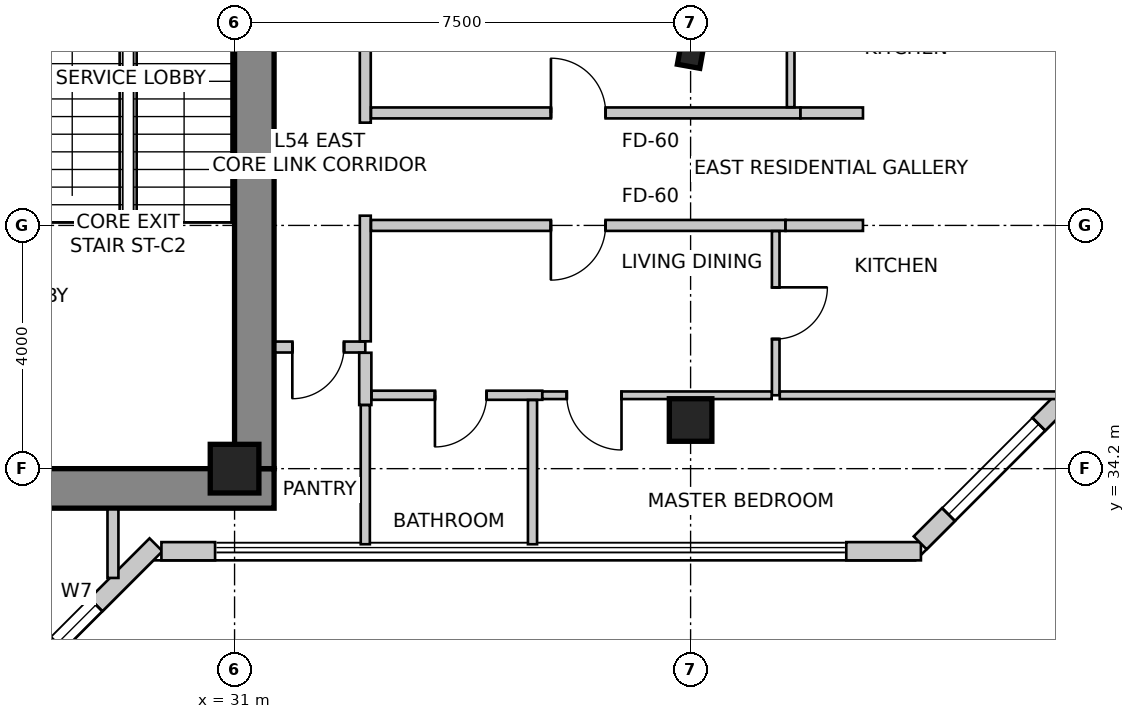
"""IFC4 building model, lengths in metres.
Left out: names, types, materials, properties, quantities, classifications, styles, units other than length and angle.
Written with IfcOpenShell. Run it as: python <this file> out.ifc"""

import sys

from ifc_helpers import new_model, si_unit, direction, frame, frame_2d, origin, origin_2d, place, context, subcontext, project, spatial, rectangle, i_section, extrude, source, transform, mapped, element, fill, save


model = new_model("IFC4")
c1 = context("Model", 3, precision=1e-05, world=origin(), true_north=direction((0.0, 1.0)))
c2 = subcontext(c1, "Body", "Model", "MODEL_VIEW")
j1 = project(units=[si_unit("LENGTHUNIT", "METRE"), si_unit("PLANEANGLEUNIT", "RADIAN")], contexts=[c1])
p1 = place(None, origin())
s1 = spatial("IfcSite", under=j1, at=p1, CompositionType="ELEMENT")
p2 = place(p1, origin())
s2 = spatial("IfcBuilding", under=s1, at=p2, CompositionType="ELEMENT")
p3 = place(p2, frame((0.0, 0.0, 214.9)))
s3 = spatial("IfcBuildingStorey", under=s2, at=p3, CompositionType="ELEMENT", Elevation=214.9)
p4 = place(p3, frame((15.95, 33.875, 0.0), z_axis=(0.0, 0.0, 1.0), x_axis=(1.0, 0.0, 0.0)))
e1 = element("IfcWall", 1, at=p4, inside=s3, PredefinedType="SHEAR", context=c2, shape_type="SweptSolid", body=[
    extrude(rectangle(XDim=15.7, YDim=0.65, at=frame_2d((7.85, 0.0))), origin(), (0.0, 0.0, 1.0), 3.5),
])
m1 = source(origin(), c2, "Body", "SweptSolid", [
    extrude(rectangle(XDim=1.1, YDim=2.15, at=frame_2d((0.55, 1.075))), frame((0.0, 0.335, 0.0), z_axis=(0.0, -1.0, 0.0), x_axis=(1.0, 0.0, 0.0)), (0.0, 0.0, 1.0), 0.67),
])
p5 = place(p4, frame((10.08, 0.0, 0.0)))
e2 = element("IfcOpeningElement", 2, at=p5, cuts=e1, PredefinedType="OPENING", context=c2, shape_type="MappedRepresentation", body=[
    mapped(m1, transform((0.0, 0.0, 0.0), scale=1.0)),
])
p6 = place(p3, frame((31.325, 34.2, 0.0), z_axis=(0.0, 0.0, 1.0), x_axis=(0.0, 1.0, 0.0)))
e3 = element("IfcWall", 3, at=p6, inside=s3, PredefinedType="SHEAR", context=c2, shape_type="SweptSolid", body=[
    extrude(rectangle(XDim=11.4, YDim=0.65, at=frame_2d((5.7, 0.0))), origin(), (0.0, 0.0, 1.0), 3.5),
])
p7 = place(p6, frame((7.35, 0.0, 0.0)))
e4 = element("IfcOpeningElement", 4, at=p7, cuts=e3, PredefinedType="OPENING", context=c2, shape_type="MappedRepresentation", body=[
    mapped(m1, transform((0.0, 0.0, 0.0), scale=1.0)),
])
m2 = source(origin(), c2, "Body", "SweptSolid", [
    extrude(rectangle(XDim=0.8, YDim=0.8, at=origin_2d()), origin(), (0.0, 0.0, 1.0), 3.5),
])
p8 = place(p3, frame((31.0, 34.2, 0.0), z_axis=(0.0, 0.0, 1.0), x_axis=(1.0, 0.0, 0.0)))
e5 = element("IfcColumn", 5, at=p8, inside=s3, PredefinedType="COLUMN", context=c2, shape_type="MappedRepresentation", body=[
    mapped(m2, transform((0.0, 0.0, 0.0), scale=1.0)),
])
m3 = source(origin(), c2, "Body", "SweptSolid", [
    extrude(rectangle(XDim=0.7, YDim=0.7, at=origin_2d()), origin(), (0.0, 0.0, 1.0), 3.5),
])
p9 = place(p3, frame((38.5, 35.0, 0.0), z_axis=(0.0, 0.0, 1.0), x_axis=(1.0, 0.0, 0.0)))
e6 = element("IfcColumn", 6, at=p9, inside=s3, PredefinedType="COLUMN", context=c2, shape_type="MappedRepresentation", body=[
    mapped(m3, transform((0.0, 0.0, 0.0), scale=1.0)),
])
m4 = source(origin(), c2, "Body", "SweptSolid", [
    extrude(i_section(OverallWidth=0.374, OverallDepth=0.372, WebThickness=0.016, FlangeThickness=0.026, FilletRadius=0.015, at=origin_2d()), origin(), (0.0, 0.0, 1.0), 3.5),
])
p10 = place(p3, frame((38.5, 41.0, 0.0), z_axis=(0.0, 0.0, 1.0), x_axis=(0.984195607969, -0.17708474032, 0.0)))
e7 = element("IfcColumn", 7, at=p10, inside=s3, PredefinedType="COLUMN", context=c2, shape_type="MappedRepresentation", body=[
    mapped(m4, transform((0.0, 0.0, 0.0), scale=1.0)),
])
p11 = place(p3, frame((27.652, 30.892, 0.0), z_axis=(0.0, 0.0, 1.0), x_axis=(0.707106781187, 0.707106781187, 0.0)))
e8 = element("IfcWall", 8, at=p11, inside=s3, PredefinedType="SOLIDWALL", context=c2, shape_type="SweptSolid", body=[
    extrude(rectangle(XDim=2.907, YDim=0.3, at=frame_2d((1.454, 0.0))), origin(), (0.0, 0.0, 1.0), 3.25),
])
m5 = source(origin(), c2, "Body", "SweptSolid", [
    extrude(rectangle(XDim=0.9, YDim=1.6, at=frame_2d((0.45, 0.8))), frame((0.0, 0.16, 0.0), z_axis=(0.0, -1.0, 0.0), x_axis=(1.0, 0.0, 0.0)), (0.0, 0.0, 1.0), 0.32),
])
p12 = place(p11, frame((0.611, 0.0, 0.85)))
e9 = element("IfcOpeningElement", 9, at=p12, cuts=e8, PredefinedType="OPENING", context=c2, shape_type="MappedRepresentation", body=[
    mapped(m5, transform((0.0, 0.0, 0.0), scale=1.0)),
])
p13 = place(p3, frame((29.797, 32.842, 0.0), z_axis=(0.0, 0.0, 1.0), x_axis=(1.0, 0.0, 0.0)))
e10 = element("IfcWall", 10, at=p13, inside=s3, PredefinedType="SOLIDWALL", context=c2, shape_type="SweptSolid", body=[
    extrude(rectangle(XDim=0.882, YDim=0.3, at=frame_2d((0.441, 0.0))), origin(), (0.0, 0.0, 1.0), 3.25),
])
p14 = place(p3, frame((41.06, 32.842, 0.0), z_axis=(0.0, 0.0, 1.0), x_axis=(1.0, 0.0, 0.0)))
e11 = element("IfcWall", 11, at=p14, inside=s3, PredefinedType="SOLIDWALL", context=c2, shape_type="SweptSolid", body=[
    extrude(rectangle(XDim=1.228, YDim=0.3, at=frame_2d((0.614, 0.0))), origin(), (0.0, 0.0, 1.0), 3.25),
])
p15 = place(p3, frame((42.276, 32.98, 0.0), z_axis=(0.0, 0.0, 1.0), x_axis=(0.707106781187, 0.707106781187, 0.0)))
e12 = element("IfcWall", 12, at=p15, inside=s3, PredefinedType="SOLIDWALL", context=c2, shape_type="SweptSolid", body=[
    extrude(rectangle(XDim=4.922, YDim=0.3, at=frame_2d((2.461, 0.0))), origin(), (0.0, 0.0, 1.0), 3.25),
])
m6 = source(origin(), c2, "Body", "SweptSolid", [
    extrude(rectangle(XDim=2.1, YDim=2.0, at=frame_2d((1.05, 1.0))), frame((0.0, 0.16, 0.0), z_axis=(0.0, -1.0, 0.0), x_axis=(1.0, 0.0, 0.0)), (0.0, 0.0, 1.0), 0.32),
])
p16 = place(p15, frame((0.659, 0.0, 0.85)))
e13 = element("IfcOpeningElement", 13, at=p16, cuts=e12, PredefinedType="OPENING", context=c2, shape_type="MappedRepresentation", body=[
    mapped(m6, transform((0.0, 0.0, 0.0), scale=1.0)),
])
p17 = place(p3, frame((29.0, 33.53, 0.0), z_axis=(0.0, 0.0, 1.0), x_axis=(0.0, -1.0, 0.0)))
e14 = element("IfcWall", 14, at=p17, inside=s3, PredefinedType="PARTITIONING", context=c2, shape_type="SweptSolid", body=[
    extrude(rectangle(XDim=1.127, YDim=0.18, at=frame_2d((0.563, 0.0))), origin(), (0.0, 0.0, 1.0), 3.25),
])
p18 = place(p3, frame((33.15, 36.2, 0.0), z_axis=(0.0, 0.0, 1.0), x_axis=(-1.0, 0.0, 0.0)))
e15 = element("IfcWall", 15, at=p18, inside=s3, PredefinedType="PARTITIONING", context=c2, shape_type="SweptSolid", body=[
    extrude(rectangle(XDim=1.48, YDim=0.18, at=frame_2d((0.74, 0.0))), origin(), (0.0, 0.0, 1.0), 3.25),
])
m7 = source(origin(), c2, "Body", "SweptSolid", [
    extrude(rectangle(XDim=0.85, YDim=2.15, at=frame_2d((0.425, 1.075))), frame((0.0, 0.1, 0.0), z_axis=(0.0, -1.0, 0.0), x_axis=(1.0, 0.0, 0.0)), (0.0, 0.0, 1.0), 0.2),
])
p19 = place(p18, frame((0.35, 0.0, 0.0)))
e16 = element("IfcOpeningElement", 16, at=p19, cuts=e15, PredefinedType="OPENING", context=c2, shape_type="MappedRepresentation", body=[
    mapped(m7, transform((0.0, 0.0, 0.0), scale=1.0)),
])
p20 = place(p3, frame((33.15, 45.577, 0.0), z_axis=(0.0, 0.0, 1.0), x_axis=(0.0, -1.0, 0.0)))
e17 = element("IfcWall", 17, at=p20, inside=s3, PredefinedType="PARTITIONING", context=c2, shape_type="SweptSolid", body=[
    extrude(rectangle(XDim=5.687, YDim=0.18, at=frame_2d((2.844, 0.0))), origin(), (0.0, 0.0, 1.0), 2.688),
])
p21 = place(p3, frame((33.15, 38.36, 0.0), z_axis=(0.0, 0.0, 1.0), x_axis=(0.0, -1.0, 0.0)))
e18 = element("IfcWall", 18, at=p21, inside=s3, PredefinedType="PARTITIONING", context=c2, shape_type="SweptSolid", body=[
    extrude(rectangle(XDim=2.066, YDim=0.18, at=frame_2d((1.033, 0.0))), origin(), (0.0, 0.0, 1.0), 3.25),
])
p22 = place(p3, frame((33.244, 40.05, 0.0), z_axis=(0.0, 0.0, 1.0), x_axis=(1.0, 0.0, 0.0)))
e19 = element("IfcWall", 19, at=p22, inside=s3, PredefinedType="PARTITIONING", context=c2, shape_type="SweptSolid", body=[
    extrude(rectangle(XDim=7.062, YDim=0.18, at=frame_2d((3.531, 0.0))), origin(), (0.0, 0.0, 1.0), 2.766),
])
m8 = source(origin(), c2, "Body", "SweptSolid", [
    extrude(rectangle(XDim=0.9, YDim=2.15, at=frame_2d((0.45, 1.075))), frame((0.0, 0.1, 0.0), z_axis=(0.0, -1.0, 0.0), x_axis=(1.0, 0.0, 0.0)), (0.0, 0.0, 1.0), 0.2),
])
p23 = place(p22, frame((2.959, 0.0, 0.0)))
e20 = element("IfcOpeningElement", 20, at=p23, cuts=e19, PredefinedType="OPENING", context=c2, shape_type="MappedRepresentation", body=[
    mapped(m8, transform((0.0, 0.0, 0.0), scale=1.0)),
])
p24 = place(p3, frame((40.308, 40.05, 0.0), z_axis=(0.0, 0.0, 1.0), x_axis=(1.0, 0.0, 0.0)))
e21 = element("IfcWall", 21, at=p24, inside=s3, PredefinedType="PARTITIONING", context=c2, shape_type="SweptSolid", body=[
    extrude(rectangle(XDim=1.027, YDim=0.18, at=frame_2d((0.513, 0.0))), origin(), (0.0, 0.0, 1.0), 3.25),
])
p25 = place(p3, frame((40.06, 38.2, 0.0), z_axis=(0.0, 0.0, 1.0), x_axis=(-1.0, 0.0, 0.0)))
e22 = element("IfcWall", 22, at=p25, inside=s3, PredefinedType="PARTITIONING", context=c2, shape_type="SweptSolid", body=[
    extrude(rectangle(XDim=6.816, YDim=0.18, at=frame_2d((3.408, 0.0))), origin(), (0.0, 0.0, 1.0), 2.766),
])
p26 = place(p25, frame((2.958, 0.0, 0.0)))
e23 = element("IfcOpeningElement", 23, at=p26, cuts=e22, PredefinedType="OPENING", context=c2, shape_type="MappedRepresentation", body=[
    mapped(m8, transform((0.0, 0.0, 0.0), scale=1.0)),
])
p27 = place(p3, frame((41.335, 38.2, 0.0), z_axis=(0.0, 0.0, 1.0), x_axis=(-1.0, 0.0, 0.0)))
e24 = element("IfcWall", 24, at=p27, inside=s3, PredefinedType="PARTITIONING", context=c2, shape_type="SweptSolid", body=[
    extrude(rectangle(XDim=1.273, YDim=0.18, at=frame_2d((0.636, 0.0))), origin(), (0.0, 0.0, 1.0), 3.25),
])
p28 = place(p3, frame((33.15, 36.106, 0.0), z_axis=(0.0, 0.0, 1.0), x_axis=(0.0, -1.0, 0.0)))
e25 = element("IfcWall", 25, at=p28, inside=s3, PredefinedType="PARTITIONING", context=c2, shape_type="SweptSolid", body=[
    extrude(rectangle(XDim=0.859, YDim=0.2, at=frame_2d((0.429, 0.0))), origin(), (0.0, 0.0, 1.0), 3.25),
])
p29 = place(p3, frame((33.15, 35.245, 0.0), z_axis=(0.0, 0.0, 1.0), x_axis=(0.0, -1.0, 0.0)))
e26 = element("IfcWall", 26, at=p29, inside=s3, PredefinedType="PARTITIONING", context=c2, shape_type="SweptSolid", body=[
    extrude(rectangle(XDim=2.288, YDim=0.15, at=frame_2d((1.144, 0.0))), origin(), (0.0, 0.0, 1.0), 3.25),
])
p30 = place(p3, frame((40.146, 45.417, 0.0), z_axis=(0.0, 0.0, 1.0), x_axis=(0.0, -1.0, 0.0)))
e27 = element("IfcWall", 27, at=p30, inside=s3, PredefinedType="PARTITIONING", context=c2, shape_type="SweptSolid", body=[
    extrude(rectangle(XDim=5.273, YDim=0.125, at=frame_2d((2.636, 0.0))), origin(), (0.0, 0.0, 1.0), 3.25),
])
m9 = source(origin(), c2, "Body", "SweptSolid", [
    extrude(rectangle(XDim=0.85, YDim=2.15, at=frame_2d((0.425, 1.075))), frame((0.0, 0.073, 0.0), z_axis=(0.0, -1.0, 0.0), x_axis=(1.0, 0.0, 0.0)), (0.0, 0.0, 1.0), 0.145),
])
p31 = place(p30, frame((2.211, 0.0, 0.0)))
e28 = element("IfcOpeningElement", 28, at=p31, cuts=e27, PredefinedType="OPENING", context=c2, shape_type="MappedRepresentation", body=[
    mapped(m9, transform((0.0, 0.0, 0.0), scale=1.0)),
])
p32 = place(p3, frame((39.9, 38.106, 0.0), z_axis=(0.0, 0.0, 1.0), x_axis=(0.0, -1.0, 0.0)))
e29 = element("IfcWall", 29, at=p32, inside=s3, PredefinedType="PARTITIONING", context=c2, shape_type="SweptSolid", body=[
    extrude(rectangle(XDim=2.699, YDim=0.125, at=frame_2d((1.35, 0.0))), origin(), (0.0, 0.0, 1.0), 3.25),
])
p33 = place(p32, frame((0.925, 0.0, 0.0)))
e30 = element("IfcOpeningElement", 30, at=p33, cuts=e29, PredefinedType="OPENING", context=c2, shape_type="MappedRepresentation", body=[
    mapped(m9, transform((0.0, 0.0, 0.0), scale=1.0)),
])
p34 = place(p3, frame((36.06, 35.407, 0.0), z_axis=(0.0, 0.0, 1.0), x_axis=(-1.0, 0.0, 0.0)))
e31 = element("IfcWall", 31, at=p34, inside=s3, PredefinedType="PARTITIONING", context=c2, shape_type="SweptSolid", body=[
    extrude(rectangle(XDim=2.806, YDim=0.15, at=frame_2d((1.403, 0.0))), origin(), (0.0, 0.0, 1.0), 3.25),
])
m10 = source(origin(), c2, "Body", "SweptSolid", [
    extrude(rectangle(XDim=0.85, YDim=2.15, at=frame_2d((0.425, 1.075))), frame((0.0, 0.085, 0.0), z_axis=(0.0, -1.0, 0.0), x_axis=(1.0, 0.0, 0.0)), (0.0, 0.0, 1.0), 0.17),
])
p35 = place(p34, frame((0.915, 0.0, 0.0)))
e32 = element("IfcOpeningElement", 32, at=p35, cuts=e31, PredefinedType="OPENING", context=c2, shape_type="MappedRepresentation", body=[
    mapped(m10, transform((0.0, 0.0, 0.0), scale=1.0)),
])
p36 = place(p3, frame((39.833, 35.407, 0.0), z_axis=(0.0, 0.0, 1.0), x_axis=(-1.0, 0.0, 0.0)))
e33 = element("IfcWall", 33, at=p36, inside=s3, PredefinedType="PARTITIONING", context=c2, shape_type="SweptSolid", body=[
    extrude(rectangle(XDim=3.771, YDim=0.125, at=frame_2d((1.886, 0.0))), origin(), (0.0, 0.0, 1.0), 2.766),
])
m11 = source(origin(), c2, "Body", "SweptSolid", [
    extrude(rectangle(XDim=0.9, YDim=2.15, at=frame_2d((0.45, 1.075))), frame((0.0, 0.073, 0.0), z_axis=(0.0, -1.0, 0.0), x_axis=(1.0, 0.0, 0.0)), (0.0, 0.0, 1.0), 0.145),
])
p37 = place(p36, frame((2.47, 0.0, 0.0)))
e34 = element("IfcOpeningElement", 34, at=p37, cuts=e33, PredefinedType="OPENING", context=c2, shape_type="MappedRepresentation", body=[
    mapped(m11, transform((0.0, 0.0, 0.0), scale=1.0)),
])
p38 = place(p3, frame((44.54, 35.407, 0.0), z_axis=(0.0, 0.0, 1.0), x_axis=(-1.0, 0.0, 0.0)))
e35 = element("IfcWall", 35, at=p38, inside=s3, PredefinedType="PARTITIONING", context=c2, shape_type="SweptSolid", body=[
    extrude(rectangle(XDim=4.574, YDim=0.125, at=frame_2d((2.287, 0.0))), origin(), (0.0, 0.0, 1.0), 3.25),
])
p39 = place(p3, frame((35.9, 35.328, 0.0), z_axis=(0.0, 0.0, 1.0), x_axis=(0.0, -1.0, 0.0)))
e36 = element("IfcWall", 36, at=p39, inside=s3, PredefinedType="PARTITIONING", context=c2, shape_type="SweptSolid", body=[
    extrude(rectangle(XDim=2.371, YDim=0.15, at=frame_2d((1.186, 0.0))), origin(), (0.0, 0.0, 1.0), 3.25),
])
m12 = source(origin(), c2, "Body", "SweptSolid", [
    extrude(rectangle(XDim=0.9, YDim=1.6, at=frame_2d((0.45, 0.8))), frame((0.0, -0.015, 0.0), z_axis=(0.0, -1.0, 0.0), x_axis=(1.0, 0.0, 0.0)), (0.0, 0.0, 1.0), 0.06),
])
p40 = place(p12, origin())
e37 = element("IfcWindow", 37, at=p40, inside=s3, PartitioningType="SINGLE_PANEL", PredefinedType="WINDOW", context=c2, shape_type="MappedRepresentation", body=[
    mapped(m12, transform((0.0, 0.0, 0.0), scale=1.0)),
])
fill(e9, e37)
m13 = source(origin(), c2, "Body", "SweptSolid", [
    extrude(rectangle(XDim=2.1, YDim=2.0, at=frame_2d((1.05, 1.0))), frame((0.0, -0.015, 0.0), z_axis=(0.0, -1.0, 0.0), x_axis=(1.0, 0.0, 0.0)), (0.0, 0.0, 1.0), 0.06),
])
p41 = place(p16, origin())
e38 = element("IfcWindow", 38, at=p41, inside=s3, PartitioningType="SINGLE_PANEL", PredefinedType="WINDOW", context=c2, shape_type="MappedRepresentation", body=[
    mapped(m13, transform((0.0, 0.0, 0.0), scale=1.0)),
])
fill(e13, e38)
m14 = source(origin(), c2, "Body", "SweptSolid", [
    extrude(rectangle(XDim=0.85, YDim=2.15, at=frame_2d((0.425, 1.075))), frame((0.0, 0.025, 0.0), z_axis=(0.0, -1.0, 0.0), x_axis=(1.0, 0.0, 0.0)), (0.0, 0.0, 1.0), 0.05),
])
p42 = place(p19, origin())
e39 = element("IfcDoor", 39, at=p42, inside=s3, OperationType="SINGLE_SWING_RIGHT", PredefinedType="DOOR", context=c2, shape_type="MappedRepresentation", body=[
    mapped(m14, transform((0.0, 0.0, 0.0), scale=1.0)),
])
fill(e16, e39)
m15 = source(origin(), c2, "Body", "SweptSolid", [
    extrude(rectangle(XDim=0.9, YDim=2.15, at=frame_2d((0.45, 1.075))), frame((0.0, 0.025, 0.0), z_axis=(0.0, -1.0, 0.0), x_axis=(1.0, 0.0, 0.0)), (0.0, 0.0, 1.0), 0.05),
])
p43 = place(p23, origin())
e40 = element("IfcDoor", 40, at=p43, inside=s3, OperationType="SINGLE_SWING_LEFT", PredefinedType="DOOR", context=c2, shape_type="MappedRepresentation", body=[
    mapped(m15, transform((0.0, 0.0, 0.0), scale=1.0)),
])
fill(e20, e40)
p44 = place(p26, origin())
e41 = element("IfcDoor", 41, at=p44, inside=s3, OperationType="SINGLE_SWING_RIGHT", PredefinedType="DOOR", context=c2, shape_type="MappedRepresentation", body=[
    mapped(m15, transform((0.0, 0.0, 0.0), scale=1.0)),
])
fill(e23, e41)
p45 = place(p33, origin())
e42 = element("IfcDoor", 42, at=p45, inside=s3, OperationType="SINGLE_SWING_LEFT", PredefinedType="DOOR", context=c2, shape_type="MappedRepresentation", body=[
    mapped(m14, transform((0.0, 0.0, 0.0), scale=1.0)),
])
fill(e30, e42)
p46 = place(p35, origin())
e43 = element("IfcDoor", 43, at=p46, inside=s3, OperationType="SINGLE_SWING_RIGHT", PredefinedType="DOOR", context=c2, shape_type="MappedRepresentation", body=[
    mapped(m14, transform((0.0, 0.0, 0.0), scale=1.0)),
])
fill(e32, e43)
m16 = source(origin(), c2, "Body", "SweptSolid", [
    extrude(rectangle(XDim=0.9, YDim=2.15, at=frame_2d((0.45, 1.075))), frame((0.0, 0.025, 0.0), z_axis=(0.0, -1.0, 0.0), x_axis=(1.0, 0.0, 0.0)), (0.0, 0.0, 1.0), 0.05),
])
p47 = place(p37, origin())
e44 = element("IfcDoor", 44, at=p47, inside=s3, OperationType="SINGLE_SWING_LEFT", PredefinedType="DOOR", context=c2, shape_type="MappedRepresentation", body=[
    mapped(m16, transform((0.0, 0.0, 0.0), scale=1.0)),
])
fill(e34, e44)
save(model, sys.argv[1])
